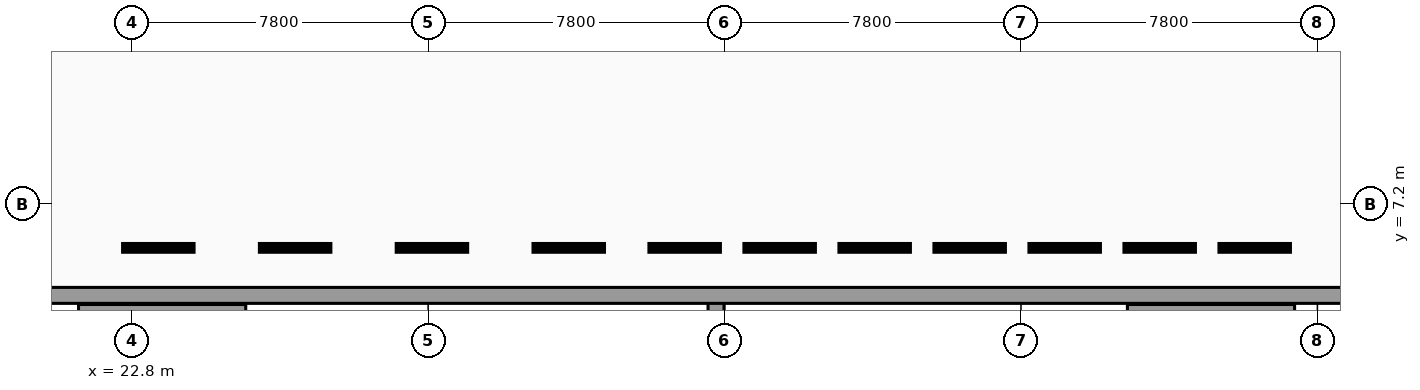
"""IFC4 building model, lengths in metres.
Left out: names, types, materials, properties, quantities, classifications, styles, units other than length and angle.
Written with IfcOpenShell. Run it as: python <this file> out.ifc"""

import sys

from ifc_helpers import new_model, si_unit, direction, frame, frame_2d, origin, place, context, subcontext, project, spatial, rectangle, extrude, element, save


model = new_model("IFC4")
c1 = context("Model", 3, precision=1e-05, world=origin(), true_north=direction((0.0, 1.0)))
c2 = subcontext(c1, "Body", "Model", "MODEL_VIEW")
j1 = project(units=[si_unit("LENGTHUNIT", "METRE"), si_unit("PLANEANGLEUNIT", "RADIAN")], contexts=[c1])
p1 = place(None, origin())
s1 = spatial("IfcSite", under=j1, at=p1, CompositionType="ELEMENT")
p2 = place(p1, origin())
s2 = spatial("IfcBuilding", under=s1, at=p2, CompositionType="ELEMENT")
p3 = place(p2, frame((0.0, 0.0, -4.08)))
s3 = spatial("IfcBuildingStorey", under=s2, at=p3, CompositionType="ELEMENT", Elevation=-4.08)
for number, where, z_axis, x_axis in (
    (1, (24.275, 2.4, 0.0), (0.0, 0.0, 1.0), (0.0, 1.0, 0.0)),
    (2, (38.175, 2.4, 0.0), (0.0, 0.0, 1.0), (0.0, 1.0, 0.0)),
    (3, (52.075, 2.4, 0.0), (0.0, 0.0, 1.0), (0.0, 1.0, 0.0)),
):
    element("IfcWall", number, at=place(p3, frame(where, z_axis=z_axis, x_axis=x_axis)), inside=s3, PredefinedType="SOLIDWALL", context=c2, shape_type="SweptSolid", body=[
        extrude(rectangle(XDim=2.4, YDim=0.42, at=frame_2d((1.2, 0.0))), origin(), (0.0, 0.0, 1.0), 3.88),
    ])
p4 = place(p3, frame((21.4, 4.35, 0.0), z_axis=(0.0, 0.0, 1.0), x_axis=(1.0, 0.0, 0.0)))
e4 = element("IfcWall", 4, at=p4, inside=s3, PredefinedType="SOLIDWALL", context=c2, shape_type="SweptSolid", body=[
    extrude(rectangle(XDim=4.4, YDim=0.42, at=frame_2d((2.2, 0.0))), origin(), (0.0, 0.0, 1.0), 3.88),
])
p5 = place(p3, frame((49.0, 4.35, 0.0), z_axis=(0.0, 0.0, 1.0), x_axis=(1.0, 0.0, 0.0)))
e5 = element("IfcWall", 5, at=p5, inside=s3, PredefinedType="SOLIDWALL", context=c2, shape_type="SweptSolid", body=[
    extrude(rectangle(XDim=4.4, YDim=0.42, at=frame_2d((2.2, 0.0))), origin(), (0.0, 0.0, 1.0), 3.88),
])
p6 = place(p3, frame((1.7, 4.8, 0.0), z_axis=(0.0, 0.0, 1.0), x_axis=(1.0, 0.0, 0.0)))
e6 = element("IfcWall", 6, at=p6, inside=s3, PredefinedType="SOLIDWALL", context=c2, shape_type="SweptSolid", body=[
    extrude(rectangle(XDim=73.4, YDim=0.42, at=frame_2d((36.7, 0.0))), origin(), (0.0, 0.0, 1.0), 3.76),
])
save(model, sys.argv[1])
